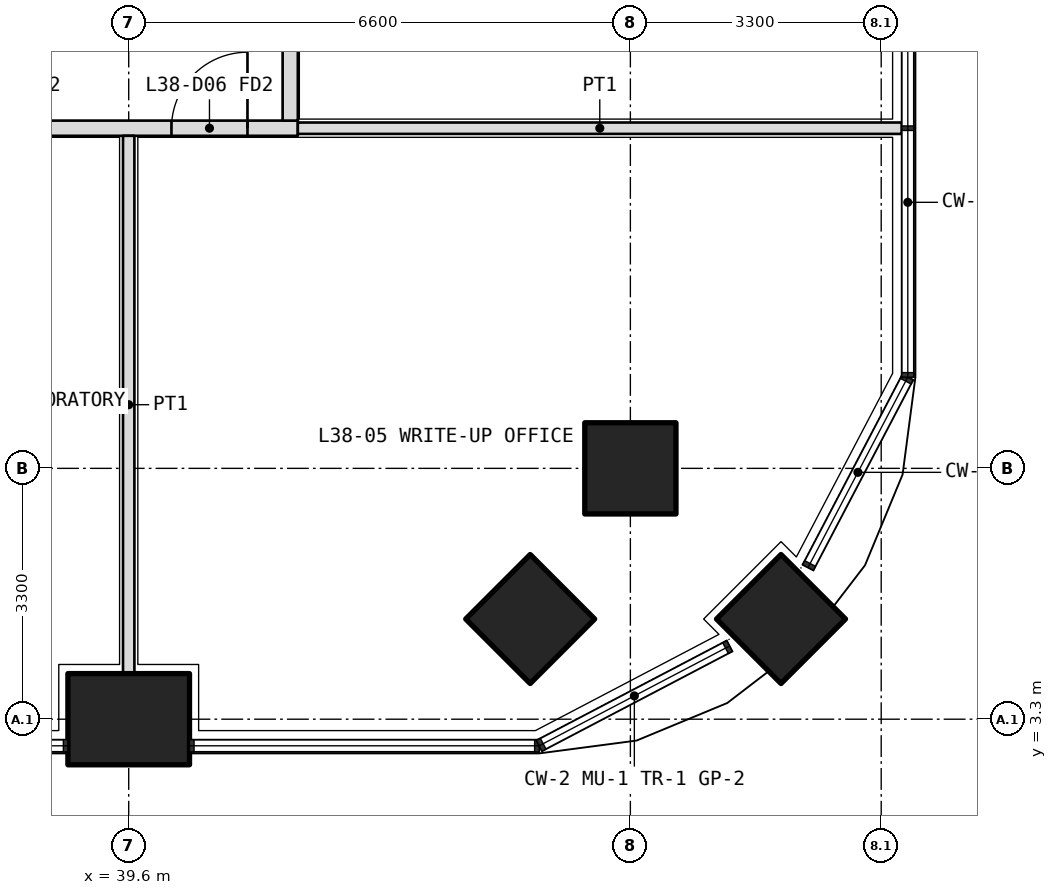
"""IFC4 building model, lengths in metres.
Left out: names, types, materials, properties, quantities, classifications, styles, units other than length and angle.
Written with IfcOpenShell. Run it as: python <this file> out.ifc"""

import sys

from ifc_helpers import new_model, si_unit, direction, frame, frame_2d, origin, origin_2d, place, context, subcontext, project, spatial, rectangle, extrude, element, fill, save


model = new_model("IFC4")
c1 = context("Model", 3, precision=1e-05, world=origin(), true_north=direction((0.0, 1.0)))
c2 = subcontext(c1, "Body", "Model", "MODEL_VIEW")
j1 = project(units=[si_unit("LENGTHUNIT", "METRE"), si_unit("PLANEANGLEUNIT", "RADIAN")], contexts=[c1])
p1 = place(None, origin())
s1 = spatial("IfcSite", under=j1, at=p1, CompositionType="ELEMENT")
p2 = place(p1, origin())
s2 = spatial("IfcBuilding", under=s1, at=p2, CompositionType="ELEMENT")
p3 = place(p2, frame((0.0, 0.0, 168.3)))
s3 = spatial("IfcBuildingStorey", under=s2, at=p3, CompositionType="ELEMENT", Elevation=168.3)
p4 = place(p3, frame((48.182, 4.618, 0.0), z_axis=(0.0, 0.0, 1.0), x_axis=(0.707106781187, 0.707106781187, 0.0)))
e1 = element("IfcColumn", 1, at=p4, inside=s3, PredefinedType="COLUMN", context=c2, shape_type="SweptSolid", body=[
    extrude(rectangle(XDim=1.2, YDim=1.2, at=origin_2d()), origin(), (0.0, 0.0, 1.0), 4.2),
])
p5 = place(p3, frame((39.6, 3.3, 0.0), z_axis=(0.0, 0.0, 1.0), x_axis=(1.0, 0.0, 0.0)))
e2 = element("IfcColumn", 2, at=p5, inside=s3, PredefinedType="COLUMN", context=c2, shape_type="SweptSolid", body=[
    extrude(rectangle(XDim=1.6, YDim=1.2, at=origin_2d()), origin(), (0.0, 0.0, 1.0), 4.2),
])
for number, where, z_axis, x_axis in (
    (3, (46.2, 6.6, 0.0), (0.0, 0.0, 1.0), (1.0, 0.0, 0.0)),
    (4, (44.882, 4.618, 0.0), (0.0, 0.0, 1.0), (0.707, 0.707, 0.0)),
):
    element("IfcColumn", number, at=place(p3, frame(where, z_axis=z_axis, x_axis=x_axis)), inside=s3, PredefinedType="COLUMN", context=c2, shape_type="SweptSolid", body=[
        extrude(rectangle(XDim=1.2, YDim=1.2, at=origin_2d()), origin(), (0.0, 0.0, 1.0), 4.2),
    ])
p6 = place(p3, frame((10.975, 11.075, 0.0), z_axis=(0.0, 0.0, 1.0), x_axis=(1.0, 0.0, 0.0)))
e5 = element("IfcWall", 5, at=p6, inside=s3, PredefinedType="PARTITIONING", context=c2, shape_type="SweptSolid", body=[
    extrude(rectangle(XDim=30.85, YDim=0.2, at=frame_2d((15.425, 0.0))), origin(), (0.0, 0.0, 1.0), 2.85),
])
p7 = place(p6, frame((7.262, 0.0, 0.0)))
e6 = element("IfcOpeningElement", 6, at=p7, cuts=e5, PredefinedType="OPENING", context=c2, shape_type="SweptSolid", body=[
    extrude(rectangle(XDim=1.0, YDim=2.1, at=frame_2d((0.5, 1.05))), frame((0.0, 0.11, 0.0), z_axis=(0.0, -1.0, 0.0), x_axis=(1.0, 0.0, 0.0)), (0.0, 0.0, 1.0), 0.22),
])
p8 = place(p6, frame((16.475, 0.0, 0.0)))
e7 = element("IfcOpeningElement", 7, at=p8, cuts=e5, PredefinedType="OPENING", context=c2, shape_type="SweptSolid", body=[
    extrude(rectangle(XDim=1.2, YDim=2.1, at=frame_2d((0.6, 1.05))), frame((0.0, 0.11, 0.0), z_axis=(0.0, -1.0, 0.0), x_axis=(1.0, 0.0, 0.0)), (0.0, 0.0, 1.0), 0.22),
])
p9 = place(p6, frame((21.525, 0.0, 0.0)))
e8 = element("IfcOpeningElement", 8, at=p9, cuts=e5, PredefinedType="OPENING", context=c2, shape_type="SweptSolid", body=[
    extrude(rectangle(XDim=1.0, YDim=2.1, at=frame_2d((0.5, 1.05))), frame((0.0, 0.11, 0.0), z_axis=(0.0, -1.0, 0.0), x_axis=(1.0, 0.0, 0.0)), (0.0, 0.0, 1.0), 0.22),
])
p10 = place(p6, frame((26.375, 0.0, 0.0)))
e9 = element("IfcOpeningElement", 9, at=p10, cuts=e5, PredefinedType="OPENING", context=c2, shape_type="SweptSolid", body=[
    extrude(rectangle(XDim=1.2, YDim=2.1, at=frame_2d((0.6, 1.05))), frame((0.0, 0.11, 0.0), z_axis=(0.0, -1.0, 0.0), x_axis=(1.0, 0.0, 0.0)), (0.0, 0.0, 1.0), 0.22),
])
p11 = place(p6, frame((29.188, 0.0, 0.0)))
e10 = element("IfcOpeningElement", 10, at=p11, cuts=e5, PredefinedType="OPENING", context=c2, shape_type="SweptSolid", body=[
    extrude(rectangle(XDim=1.0, YDim=2.1, at=frame_2d((0.5, 1.05))), frame((0.0, 0.11, 0.0), z_axis=(0.0, -1.0, 0.0), x_axis=(1.0, 0.0, 0.0)), (0.0, 0.0, 1.0), 0.22),
])
p12 = place(p3, frame((41.725, 11.175, 0.0), z_axis=(0.0, 0.0, 1.0), x_axis=(0.0, 1.0, 0.0)))
e11 = element("IfcWall", 11, at=p12, inside=s3, PredefinedType="PARTITIONING", context=c2, shape_type="SweptSolid", body=[
    extrude(rectangle(XDim=23.85, YDim=0.2, at=frame_2d((11.925, 0.0))), origin(), (0.0, 0.0, 1.0), 2.85),
])
p13 = place(p12, frame((3.762, 0.0, 0.0)))
e12 = element("IfcOpeningElement", 12, at=p13, cuts=e11, PredefinedType="OPENING", context=c2, shape_type="SweptSolid", body=[
    extrude(rectangle(XDim=1.0, YDim=2.1, at=frame_2d((0.5, 1.05))), frame((0.0, 0.11, 0.0), z_axis=(0.0, -1.0, 0.0), x_axis=(1.0, 0.0, 0.0)), (0.0, 0.0, 1.0), 0.22),
])
p14 = place(p12, frame((9.625, 0.0, 0.0)))
e13 = element("IfcOpeningElement", 13, at=p14, cuts=e11, PredefinedType="OPENING", context=c2, shape_type="SweptSolid", body=[
    extrude(rectangle(XDim=1.0, YDim=2.1, at=frame_2d((0.5, 1.05))), frame((0.0, 0.11, 0.0), z_axis=(0.0, -1.0, 0.0), x_axis=(1.0, 0.0, 0.0)), (0.0, 0.0, 1.0), 0.22),
])
p15 = place(p12, frame((12.975, 0.0, 0.0)))
e14 = element("IfcOpeningElement", 14, at=p15, cuts=e11, PredefinedType="OPENING", context=c2, shape_type="SweptSolid", body=[
    extrude(rectangle(XDim=0.9, YDim=2.1, at=frame_2d((0.45, 1.05))), frame((0.0, 0.11, 0.0), z_axis=(0.0, -1.0, 0.0), x_axis=(1.0, 0.0, 0.0)), (0.0, 0.0, 1.0), 0.22),
])
p16 = place(p12, frame((17.925, 0.0, 0.0)))
e15 = element("IfcOpeningElement", 15, at=p16, cuts=e11, PredefinedType="OPENING", context=c2, shape_type="SweptSolid", body=[
    extrude(rectangle(XDim=1.2, YDim=2.1, at=frame_2d((0.6, 1.05))), frame((0.0, 0.11, 0.0), z_axis=(0.0, -1.0, 0.0), x_axis=(1.0, 0.0, 0.0)), (0.0, 0.0, 1.0), 0.22),
])
p17 = place(p12, frame((22.387, 0.0, 0.0)))
e16 = element("IfcOpeningElement", 16, at=p17, cuts=e11, PredefinedType="OPENING", context=c2, shape_type="SweptSolid", body=[
    extrude(rectangle(XDim=1.0, YDim=2.1, at=frame_2d((0.5, 1.05))), frame((0.0, 0.11, 0.0), z_axis=(0.0, -1.0, 0.0), x_axis=(1.0, 0.0, 0.0)), (0.0, 0.0, 1.0), 0.22),
])
p18 = place(p3, frame((49.77, 11.075, 0.0), z_axis=(0.0, 0.0, 1.0), x_axis=(-1.0, 0.0, 0.0)))
e17 = element("IfcWall", 17, at=p18, inside=s3, PredefinedType="PARTITIONING", context=c2, shape_type="SweptSolid", body=[
    extrude(rectangle(XDim=7.945, YDim=0.15, at=frame_2d((3.973, 0.0))), origin(), (0.0, 0.0, 1.0), 2.7),
])
p19 = place(p3, frame((39.6, 3.9, 0.0), z_axis=(0.0, 0.0, 1.0), x_axis=(0.0, 1.0, 0.0)))
e18 = element("IfcWall", 18, at=p19, inside=s3, PredefinedType="PARTITIONING", context=c2, shape_type="SweptSolid", body=[
    extrude(rectangle(XDim=7.075, YDim=0.15, at=frame_2d((3.538, 0.0))), origin(), (0.0, 0.0, 1.0), 2.85),
])
p20 = place(p11, origin())
e19 = element("IfcDoor", 19, at=p20, inside=s3, OperationType="SINGLE_SWING_RIGHT", PredefinedType="DOOR", context=c2, shape_type="SweptSolid", body=[
    extrude(rectangle(XDim=1.0, YDim=2.1, at=frame_2d((0.5, 1.05))), frame((0.0, 0.025, 0.0), z_axis=(0.0, -1.0, 0.0), x_axis=(1.0, 0.0, 0.0)), (0.0, 0.0, 1.0), 0.05),
])
fill(e10, e19)
save(model, sys.argv[1])
